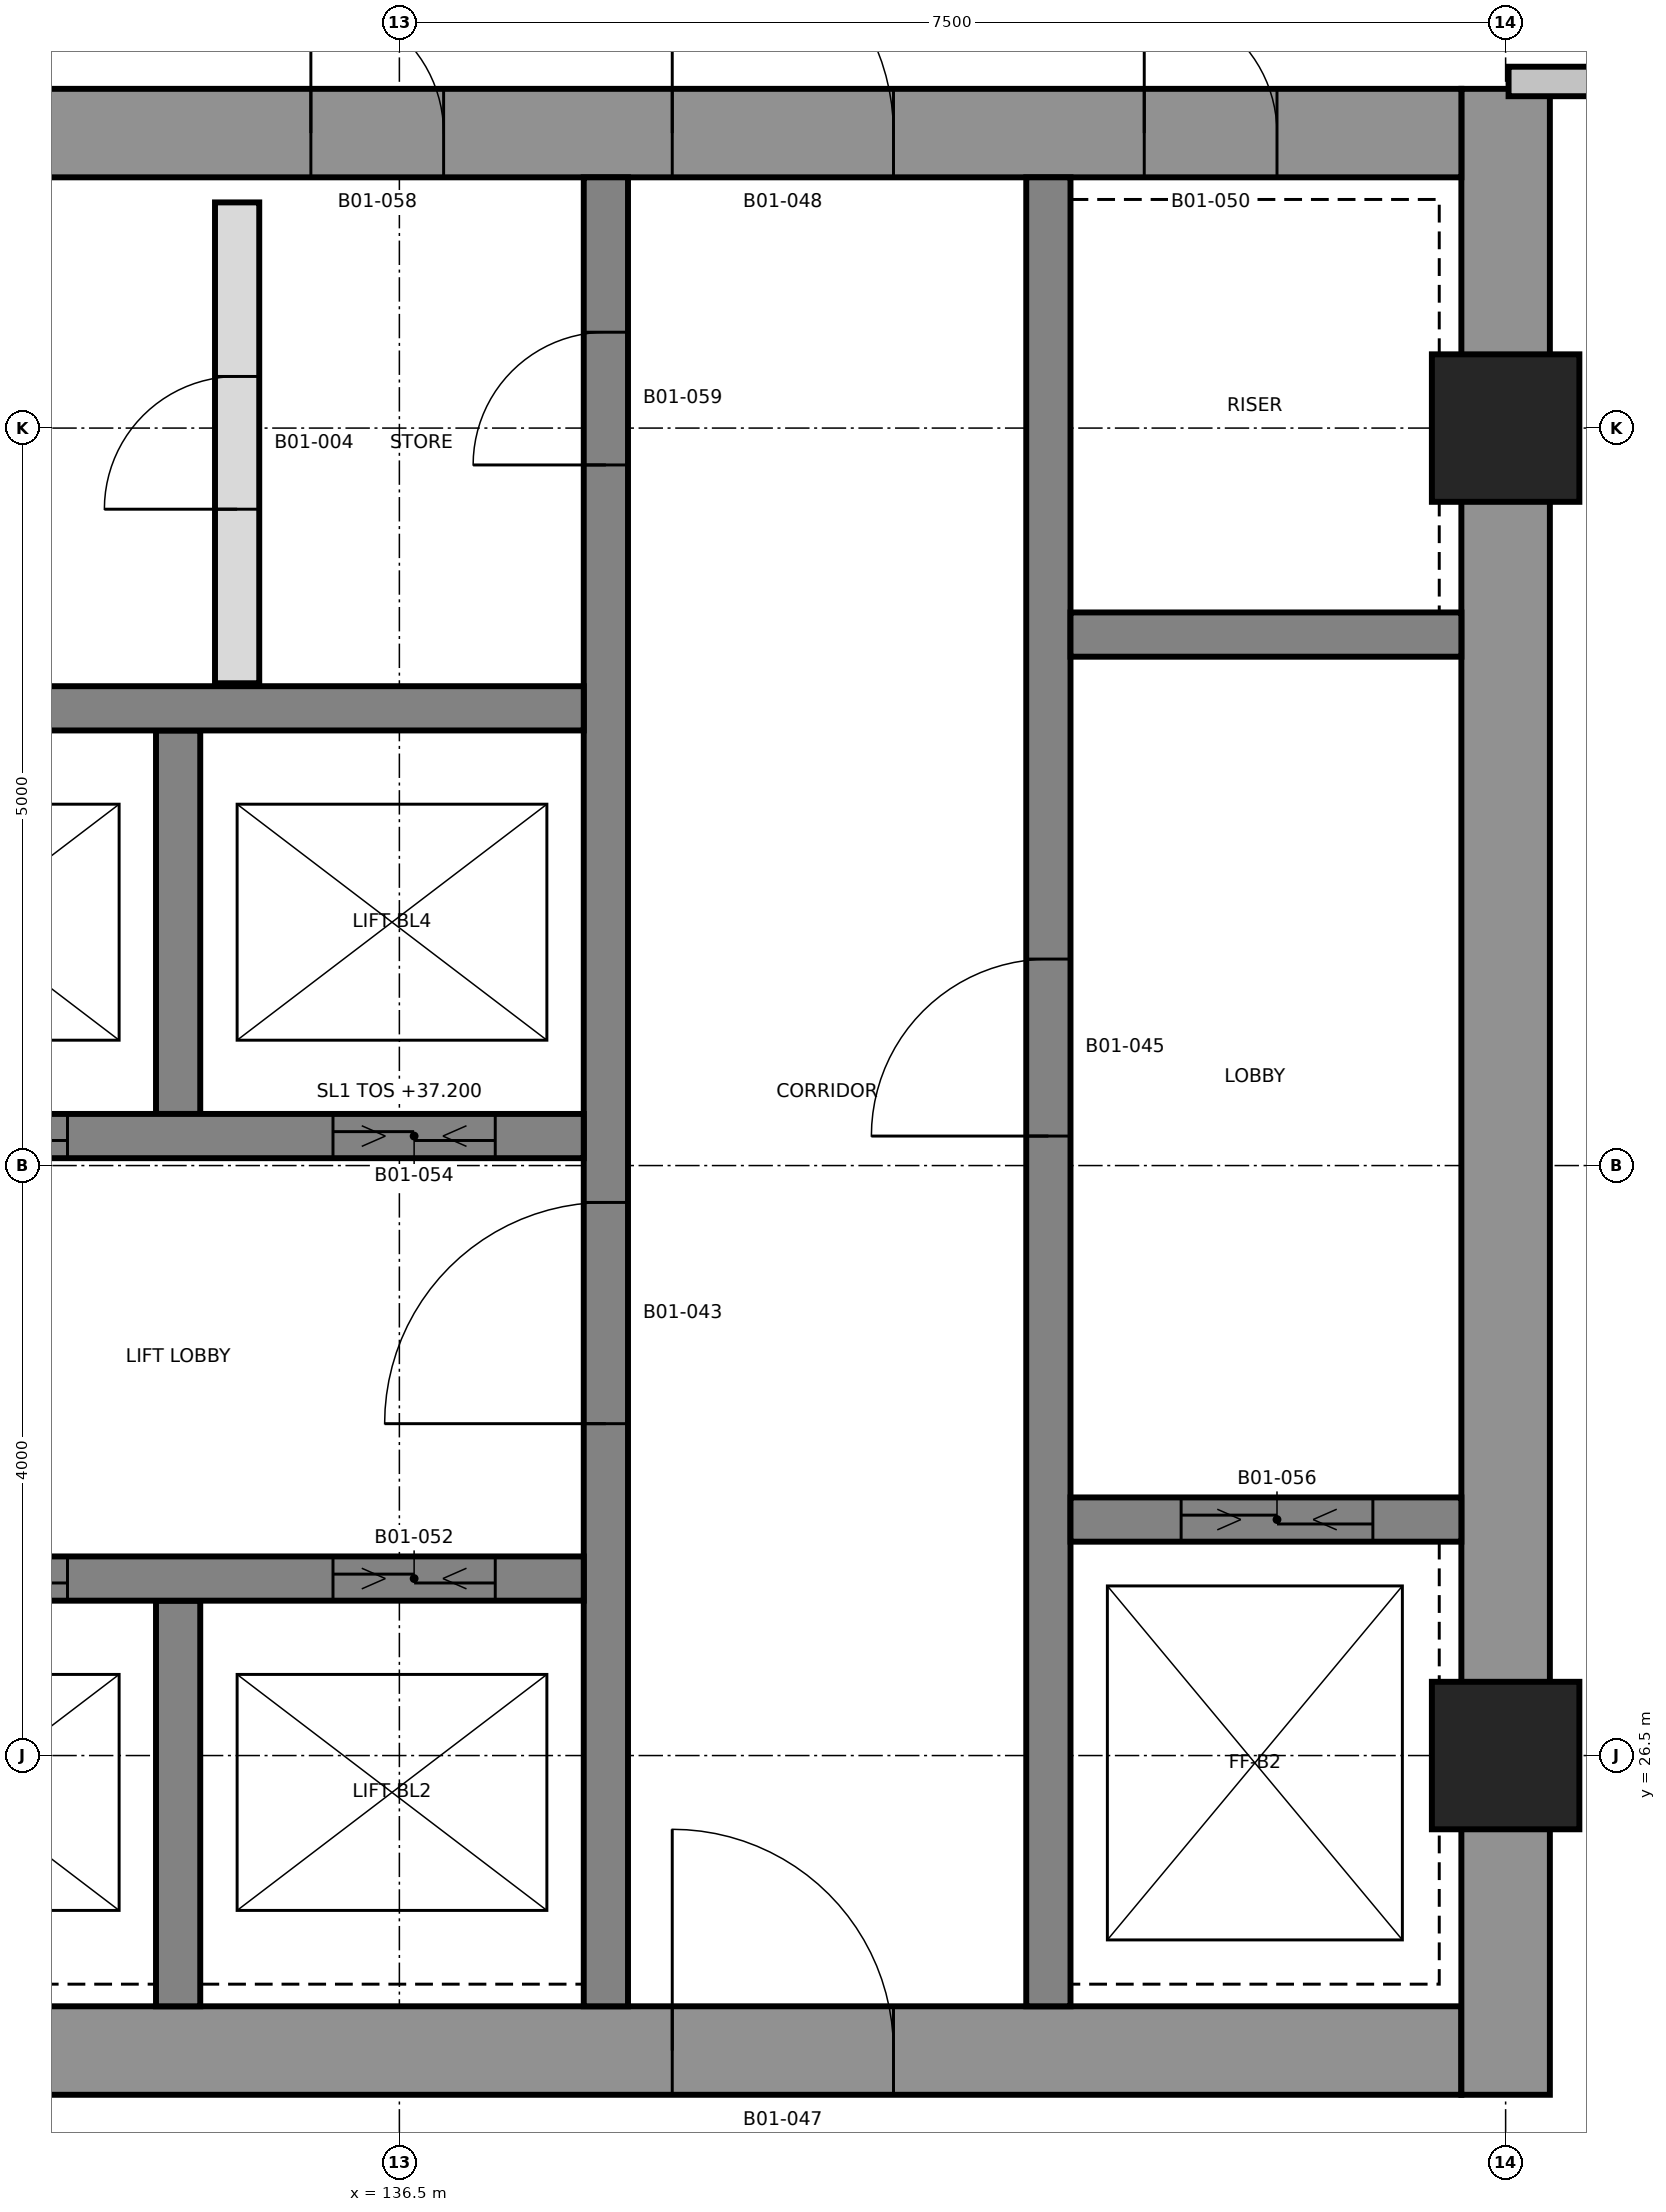
"""IFC4 building model, lengths in metres.
Left out: names, types, materials, properties, quantities, classifications, styles, units other than length and angle.
Written with IfcOpenShell. Run it as: python <this file> out.ifc"""

import sys

from ifc_helpers import new_model, si_unit, direction, frame, frame_2d, origin, origin_2d, place, context, subcontext, project, spatial, rectangle, extrude, element, fill, save


model = new_model("IFC4")
c1 = context("Model", 3, precision=1e-05, world=origin(), true_north=direction((0.0, 1.0)))
c2 = subcontext(c1, "Body", "Model", "MODEL_VIEW")
j1 = project(units=[si_unit("LENGTHUNIT", "METRE"), si_unit("PLANEANGLEUNIT", "RADIAN")], contexts=[c1])
p1 = place(None, origin())
s1 = spatial("IfcSite", under=j1, at=p1, CompositionType="ELEMENT")
p2 = place(p1, origin())
s2 = spatial("IfcBuilding", under=s1, at=p2, CompositionType="ELEMENT")
p3 = place(p2, frame((0.0, 0.0, 37.2)))
s3 = spatial("IfcBuildingStorey", under=s2, at=p3, CompositionType="ELEMENT", Elevation=37.2)
p4 = place(p3, frame((128.7, 24.5, 0.0), z_axis=(0.0, 0.0, 1.0), x_axis=(1.0, 0.0, 0.0)))
e1 = element("IfcWall", 1, at=p4, inside=s3, PredefinedType="SHEAR", context=c2, shape_type="SweptSolid", body=[
    extrude(rectangle(XDim=15.0, YDim=0.6, at=frame_2d((7.5, 0.0))), origin(), (0.0, 0.0, 1.0), 3.7),
])
p5 = place(p4, frame((9.65, 0.0, 0.0)))
e2 = element("IfcOpeningElement", 2, at=p5, cuts=e1, PredefinedType="OPENING", context=c2, shape_type="SweptSolid", body=[
    extrude(rectangle(XDim=1.5, YDim=2.1, at=frame_2d((0.75, 1.05))), frame((0.0, 0.31, 0.0), z_axis=(0.0, -1.0, 0.0), x_axis=(1.0, 0.0, 0.0)), (0.0, 0.0, 1.0), 0.62),
])
p6 = place(p4, frame((1.25, 0.0, 0.0)))
e3 = element("IfcOpeningElement", 3, at=p6, cuts=e1, PredefinedType="OPENING", context=c2, shape_type="SweptSolid", body=[
    extrude(rectangle(XDim=0.9, YDim=2.1, at=frame_2d((0.45, 1.05))), frame((0.0, 0.31, 0.0), z_axis=(0.0, -1.0, 0.0), x_axis=(1.0, 0.0, 0.0)), (0.0, 0.0, 1.0), 0.62),
])
p7 = place(p3, frame((144.0, 24.2, 0.0), z_axis=(0.0, 0.0, 1.0), x_axis=(0.0, 1.0, 0.0)))
e4 = element("IfcWall", 4, at=p7, inside=s3, PredefinedType="SHEAR", context=c2, shape_type="SweptSolid", body=[
    extrude(rectangle(XDim=13.6, YDim=0.6, at=frame_2d((6.8, 0.0))), origin(), (0.0, 0.0, 1.0), 3.7),
])
p8 = place(p3, frame((128.7, 37.5, 0.0), z_axis=(0.0, 0.0, 1.0), x_axis=(1.0, 0.0, 0.0)))
e5 = element("IfcWall", 5, at=p8, inside=s3, PredefinedType="SHEAR", context=c2, shape_type="SweptSolid", body=[
    extrude(rectangle(XDim=15.0, YDim=0.6, at=frame_2d((7.5, 0.0))), origin(), (0.0, 0.0, 1.0), 3.7),
])
p9 = place(p8, frame((9.65, 0.0, 0.0)))
e6 = element("IfcOpeningElement", 6, at=p9, cuts=e5, PredefinedType="OPENING", context=c2, shape_type="SweptSolid", body=[
    extrude(rectangle(XDim=1.5, YDim=2.1, at=frame_2d((0.75, 1.05))), frame((0.0, 0.31, 0.0), z_axis=(0.0, -1.0, 0.0), x_axis=(1.0, 0.0, 0.0)), (0.0, 0.0, 1.0), 0.62),
])
p10 = place(p8, frame((12.85, 0.0, 0.0)))
e7 = element("IfcOpeningElement", 7, at=p10, cuts=e5, PredefinedType="OPENING", context=c2, shape_type="SweptSolid", body=[
    extrude(rectangle(XDim=0.9, YDim=2.1, at=frame_2d((0.45, 1.05))), frame((0.0, 0.31, 0.0), z_axis=(0.0, -1.0, 0.0), x_axis=(1.0, 0.0, 0.0)), (0.0, 0.0, 1.0), 0.62),
])
p11 = place(p8, frame((4.3, 0.0, 0.0)))
e8 = element("IfcOpeningElement", 8, at=p11, cuts=e5, PredefinedType="OPENING", context=c2, shape_type="SweptSolid", body=[
    extrude(rectangle(XDim=0.9, YDim=2.1, at=frame_2d((0.45, 1.05))), frame((0.0, 0.31, 0.0), z_axis=(0.0, -1.0, 0.0), x_axis=(1.0, 0.0, 0.0)), (0.0, 0.0, 1.0), 0.62),
])
p12 = place(p8, frame((7.2, 0.0, 0.0)))
e9 = element("IfcOpeningElement", 9, at=p12, cuts=e5, PredefinedType="OPENING", context=c2, shape_type="SweptSolid", body=[
    extrude(rectangle(XDim=0.9, YDim=2.1, at=frame_2d((0.45, 1.05))), frame((0.0, 0.31, 0.0), z_axis=(0.0, -1.0, 0.0), x_axis=(1.0, 0.0, 0.0)), (0.0, 0.0, 1.0), 0.62),
])
p13 = place(p3, frame((137.9, 24.8, 0.0), z_axis=(0.0, 0.0, 1.0), x_axis=(0.0, 1.0, 0.0)))
e10 = element("IfcWall", 10, at=p13, inside=s3, PredefinedType="SHEAR", context=c2, shape_type="SweptSolid", body=[
    extrude(rectangle(XDim=12.4, YDim=0.3, at=frame_2d((6.2, 0.0))), origin(), (0.0, 0.0, 1.0), 3.7),
])
p14 = place(p13, frame((3.95, 0.0, 0.0)))
e11 = element("IfcOpeningElement", 11, at=p14, cuts=e10, PredefinedType="OPENING", context=c2, shape_type="SweptSolid", body=[
    extrude(rectangle(XDim=1.5, YDim=2.1, at=frame_2d((0.75, 1.05))), frame((0.0, 0.16, 0.0), z_axis=(0.0, -1.0, 0.0), x_axis=(1.0, 0.0, 0.0)), (0.0, 0.0, 1.0), 0.32),
])
p15 = place(p13, frame((10.45, 0.0, 0.0)))
e12 = element("IfcOpeningElement", 12, at=p15, cuts=e10, PredefinedType="OPENING", context=c2, shape_type="SweptSolid", body=[
    extrude(rectangle(XDim=0.9, YDim=2.1, at=frame_2d((0.45, 1.05))), frame((0.0, 0.16, 0.0), z_axis=(0.0, -1.0, 0.0), x_axis=(1.0, 0.0, 0.0)), (0.0, 0.0, 1.0), 0.32),
])
p16 = place(p3, frame((140.9, 24.8, 0.0), z_axis=(0.0, 0.0, 1.0), x_axis=(0.0, 1.0, 0.0)))
e13 = element("IfcWall", 13, at=p16, inside=s3, PredefinedType="SHEAR", context=c2, shape_type="SweptSolid", body=[
    extrude(rectangle(XDim=12.4, YDim=0.3, at=frame_2d((6.2, 0.0))), origin(), (0.0, 0.0, 1.0), 3.7),
])
p17 = place(p16, frame((5.9, 0.0, 0.0)))
e14 = element("IfcOpeningElement", 14, at=p17, cuts=e13, PredefinedType="OPENING", context=c2, shape_type="SweptSolid", body=[
    extrude(rectangle(XDim=1.2, YDim=2.1, at=frame_2d((0.6, 1.05))), frame((0.0, 0.16, 0.0), z_axis=(0.0, -1.0, 0.0), x_axis=(1.0, 0.0, 0.0)), (0.0, 0.0, 1.0), 0.32),
])
p18 = place(p3, frame((135.0, 24.8, 0.0), z_axis=(0.0, 0.0, 1.0), x_axis=(0.0, 1.0, 0.0)))
e15 = element("IfcWall", 15, at=p18, inside=s3, PredefinedType="SHEAR", context=c2, shape_type="SweptSolid", body=[
    extrude(rectangle(XDim=2.75, YDim=0.3, at=frame_2d((1.375, 0.0))), origin(), (0.0, 0.0, 1.0), 3.7),
])
p19 = place(p3, frame((135.0, 30.85, 0.0), z_axis=(0.0, 0.0, 1.0), x_axis=(0.0, 1.0, 0.0)))
e16 = element("IfcWall", 16, at=p19, inside=s3, PredefinedType="SHEAR", context=c2, shape_type="SweptSolid", body=[
    extrude(rectangle(XDim=2.6, YDim=0.3, at=frame_2d((1.3, 0.0))), origin(), (0.0, 0.0, 1.0), 3.7),
])
p20 = place(p3, frame((132.25, 27.7, 0.0), z_axis=(0.0, 0.0, 1.0), x_axis=(1.0, 0.0, 0.0)))
e17 = element("IfcWall", 17, at=p20, inside=s3, PredefinedType="SHEAR", context=c2, shape_type="SweptSolid", body=[
    extrude(rectangle(XDim=5.5, YDim=0.3, at=frame_2d((2.75, 0.0))), origin(), (0.0, 0.0, 1.0), 3.7),
])
p21 = place(p20, frame((0.9, 0.0, 0.0)))
e18 = element("IfcOpeningElement", 18, at=p21, cuts=e17, PredefinedType="OPENING", context=c2, shape_type="SweptSolid", body=[
    extrude(rectangle(XDim=1.1, YDim=2.4, at=frame_2d((0.55, 1.2))), frame((0.0, 0.16, 0.0), z_axis=(0.0, -1.0, 0.0), x_axis=(1.0, 0.0, 0.0)), (0.0, 0.0, 1.0), 0.32),
])
p22 = place(p20, frame((3.8, 0.0, 0.0)))
e19 = element("IfcOpeningElement", 19, at=p22, cuts=e17, PredefinedType="OPENING", context=c2, shape_type="SweptSolid", body=[
    extrude(rectangle(XDim=1.1, YDim=2.4, at=frame_2d((0.55, 1.2))), frame((0.0, 0.16, 0.0), z_axis=(0.0, -1.0, 0.0), x_axis=(1.0, 0.0, 0.0)), (0.0, 0.0, 1.0), 0.32),
])
p23 = place(p3, frame((132.25, 30.7, 0.0), z_axis=(0.0, 0.0, 1.0), x_axis=(1.0, 0.0, 0.0)))
e20 = element("IfcWall", 20, at=p23, inside=s3, PredefinedType="SHEAR", context=c2, shape_type="SweptSolid", body=[
    extrude(rectangle(XDim=5.5, YDim=0.3, at=frame_2d((2.75, 0.0))), origin(), (0.0, 0.0, 1.0), 3.7),
])
p24 = place(p23, frame((0.9, 0.0, 0.0)))
e21 = element("IfcOpeningElement", 21, at=p24, cuts=e20, PredefinedType="OPENING", context=c2, shape_type="SweptSolid", body=[
    extrude(rectangle(XDim=1.1, YDim=2.4, at=frame_2d((0.55, 1.2))), frame((0.0, 0.16, 0.0), z_axis=(0.0, -1.0, 0.0), x_axis=(1.0, 0.0, 0.0)), (0.0, 0.0, 1.0), 0.32),
])
p25 = place(p23, frame((3.8, 0.0, 0.0)))
e22 = element("IfcOpeningElement", 22, at=p25, cuts=e20, PredefinedType="OPENING", context=c2, shape_type="SweptSolid", body=[
    extrude(rectangle(XDim=1.1, YDim=2.4, at=frame_2d((0.55, 1.2))), frame((0.0, 0.16, 0.0), z_axis=(0.0, -1.0, 0.0), x_axis=(1.0, 0.0, 0.0)), (0.0, 0.0, 1.0), 0.32),
])
p26 = place(p3, frame((132.25, 33.6, 0.0), z_axis=(0.0, 0.0, 1.0), x_axis=(1.0, 0.0, 0.0)))
e23 = element("IfcWall", 23, at=p26, inside=s3, PredefinedType="SHEAR", context=c2, shape_type="SweptSolid", body=[
    extrude(rectangle(XDim=5.5, YDim=0.3, at=frame_2d((2.75, 0.0))), origin(), (0.0, 0.0, 1.0), 3.7),
])
p27 = place(p3, frame((141.05, 28.1, 0.0), z_axis=(0.0, 0.0, 1.0), x_axis=(1.0, 0.0, 0.0)))
e24 = element("IfcWall", 24, at=p27, inside=s3, PredefinedType="SHEAR", context=c2, shape_type="SweptSolid", body=[
    extrude(rectangle(XDim=2.65, YDim=0.3, at=frame_2d((1.325, 0.0))), origin(), (0.0, 0.0, 1.0), 3.7),
])
p28 = place(p27, frame((0.75, 0.0, 0.0)))
e25 = element("IfcOpeningElement", 25, at=p28, cuts=e24, PredefinedType="OPENING", context=c2, shape_type="SweptSolid", body=[
    extrude(rectangle(XDim=1.3, YDim=2.4, at=frame_2d((0.65, 1.2))), frame((0.0, 0.16, 0.0), z_axis=(0.0, -1.0, 0.0), x_axis=(1.0, 0.0, 0.0)), (0.0, 0.0, 1.0), 0.32),
])
p29 = place(p3, frame((141.05, 34.1, 0.0), z_axis=(0.0, 0.0, 1.0), x_axis=(1.0, 0.0, 0.0)))
e26 = element("IfcWall", 26, at=p29, inside=s3, PredefinedType="SHEAR", context=c2, shape_type="SweptSolid", body=[
    extrude(rectangle(XDim=2.65, YDim=0.3, at=frame_2d((1.325, 0.0))), origin(), (0.0, 0.0, 1.0), 3.7),
])
for number, where, z_axis, x_axis in (
    (27, (144.0, 26.5, 0.0), (0.0, 0.0, 1.0), (1.0, 0.0, 0.0)),
    (28, (144.0, 35.5, 0.0), (0.0, 0.0, 1.0), (1.0, 0.0, 0.0)),
):
    element("IfcColumn", number, at=place(p3, frame(where, z_axis=z_axis, x_axis=x_axis)), inside=s3, PredefinedType="COLUMN", context=c2, shape_type="SweptSolid", body=[
        extrude(rectangle(XDim=1.0, YDim=1.0, at=origin_2d()), origin(), (0.0, 0.0, 1.0), 3.7),
    ])
p30 = place(p3, frame((144.02, 37.85, 0.0), z_axis=(0.0, 0.0, 1.0), x_axis=(1.0, 0.0, 0.0)))
e29 = element("IfcWall", 29, at=p30, inside=s3, PredefinedType="PARTITIONING", context=c2, shape_type="SweptSolid", body=[
    extrude(rectangle(XDim=3.23, YDim=0.2, at=frame_2d((1.615, 0.0))), origin(), (0.0, 0.0, 1.0), 3.4),
])
p31 = place(p30, frame((1.03, 0.0, 0.0)))
e30 = element("IfcOpeningElement", 30, at=p31, cuts=e29, PredefinedType="OPENING", context=c2, shape_type="SweptSolid", body=[
    extrude(rectangle(XDim=1.5, YDim=2.1, at=frame_2d((0.75, 1.05))), frame((0.0, 0.11, 0.0), z_axis=(0.0, -1.0, 0.0), x_axis=(1.0, 0.0, 0.0)), (0.0, 0.0, 1.0), 0.22),
])
p32 = place(p3, frame((135.4, 33.77, 0.0), z_axis=(0.0, 0.0, 1.0), x_axis=(0.0, 1.0, 0.0)))
e31 = element("IfcWall", 31, at=p32, inside=s3, PredefinedType="PARTITIONING", context=c2, shape_type="SweptSolid", body=[
    extrude(rectangle(XDim=3.26, YDim=0.3, at=frame_2d((1.63, 0.0))), origin(), (0.0, 0.0, 1.0), 3.4),
])
p33 = place(p32, frame((1.18, 0.0, 0.0)))
e32 = element("IfcOpeningElement", 32, at=p33, cuts=e31, PredefinedType="OPENING", context=c2, shape_type="SweptSolid", body=[
    extrude(rectangle(XDim=0.9, YDim=2.1, at=frame_2d((0.45, 1.05))), frame((0.0, 0.16, 0.0), z_axis=(0.0, -1.0, 0.0), x_axis=(1.0, 0.0, 0.0)), (0.0, 0.0, 1.0), 0.32),
])
p34 = place(p33, origin())
e33 = element("IfcDoor", 33, at=p34, inside=s3, OperationType="SINGLE_SWING_RIGHT", PredefinedType="DOOR", context=c2, shape_type="SweptSolid", body=[
    extrude(rectangle(XDim=0.9, YDim=2.1, at=frame_2d((0.45, 1.05))), frame((0.0, 0.025, 0.0), z_axis=(0.0, -1.0, 0.0), x_axis=(1.0, 0.0, 0.0)), (0.0, 0.0, 1.0), 0.05),
])
fill(e32, e33)
p35 = place(p14, origin())
e34 = element("IfcDoor", 34, at=p35, inside=s3, OperationType="SINGLE_SWING_RIGHT", PredefinedType="DOOR", context=c2, shape_type="SweptSolid", body=[
    extrude(rectangle(XDim=1.5, YDim=2.1, at=frame_2d((0.75, 1.05))), frame((0.0, 0.025, 0.0), z_axis=(0.0, -1.0, 0.0), x_axis=(1.0, 0.0, 0.0)), (0.0, 0.0, 1.0), 0.05),
])
fill(e11, e34)
p36 = place(p17, origin())
e35 = element("IfcDoor", 35, at=p36, inside=s3, OperationType="SINGLE_SWING_RIGHT", PredefinedType="DOOR", context=c2, shape_type="SweptSolid", body=[
    extrude(rectangle(XDim=1.2, YDim=2.1, at=frame_2d((0.6, 1.05))), frame((0.0, 0.025, 0.0), z_axis=(0.0, -1.0, 0.0), x_axis=(1.0, 0.0, 0.0)), (0.0, 0.0, 1.0), 0.05),
])
fill(e14, e35)
p37 = place(p5, origin())
e36 = element("IfcDoor", 36, at=p37, inside=s3, OperationType="SINGLE_SWING_LEFT", PredefinedType="DOOR", context=c2, shape_type="SweptSolid", body=[
    extrude(rectangle(XDim=1.5, YDim=2.1, at=frame_2d((0.75, 1.05))), frame((0.0, 0.025, 0.0), z_axis=(0.0, -1.0, 0.0), x_axis=(1.0, 0.0, 0.0)), (0.0, 0.0, 1.0), 0.05),
])
fill(e2, e36)
p38 = place(p9, origin())
e37 = element("IfcDoor", 37, at=p38, inside=s3, OperationType="SINGLE_SWING_RIGHT", PredefinedType="DOOR", context=c2, shape_type="SweptSolid", body=[
    extrude(rectangle(XDim=1.5, YDim=2.1, at=frame_2d((0.75, 1.05))), frame((0.0, 0.025, 0.0), z_axis=(0.0, -1.0, 0.0), x_axis=(1.0, 0.0, 0.0)), (0.0, 0.0, 1.0), 0.05),
])
fill(e6, e37)
p39 = place(p10, origin())
e38 = element("IfcDoor", 38, at=p39, inside=s3, OperationType="SINGLE_SWING_RIGHT", PredefinedType="DOOR", context=c2, shape_type="SweptSolid", body=[
    extrude(rectangle(XDim=0.9, YDim=2.1, at=frame_2d((0.45, 1.05))), frame((0.0, 0.025, 0.0), z_axis=(0.0, -1.0, 0.0), x_axis=(1.0, 0.0, 0.0)), (0.0, 0.0, 1.0), 0.05),
])
fill(e7, e38)
p40 = place(p21, origin())
e39 = element("IfcDoor", 39, at=p40, inside=s3, OperationType="SLIDING_TO_LEFT", PredefinedType="DOOR", context=c2, shape_type="SweptSolid", body=[
    extrude(rectangle(XDim=1.1, YDim=2.4, at=frame_2d((0.55, 1.2))), frame((0.0, 0.025, 0.0), z_axis=(0.0, -1.0, 0.0), x_axis=(1.0, 0.0, 0.0)), (0.0, 0.0, 1.0), 0.05),
])
fill(e18, e39)
p41 = place(p22, origin())
e40 = element("IfcDoor", 40, at=p41, inside=s3, OperationType="SLIDING_TO_LEFT", PredefinedType="DOOR", context=c2, shape_type="SweptSolid", body=[
    extrude(rectangle(XDim=1.1, YDim=2.4, at=frame_2d((0.55, 1.2))), frame((0.0, 0.025, 0.0), z_axis=(0.0, -1.0, 0.0), x_axis=(1.0, 0.0, 0.0)), (0.0, 0.0, 1.0), 0.05),
])
fill(e19, e40)
p42 = place(p24, origin())
e41 = element("IfcDoor", 41, at=p42, inside=s3, OperationType="SLIDING_TO_LEFT", PredefinedType="DOOR", context=c2, shape_type="SweptSolid", body=[
    extrude(rectangle(XDim=1.1, YDim=2.4, at=frame_2d((0.55, 1.2))), frame((0.0, 0.025, 0.0), z_axis=(0.0, -1.0, 0.0), x_axis=(1.0, 0.0, 0.0)), (0.0, 0.0, 1.0), 0.05),
])
fill(e21, e41)
p43 = place(p25, origin())
e42 = element("IfcDoor", 42, at=p43, inside=s3, OperationType="SLIDING_TO_LEFT", PredefinedType="DOOR", context=c2, shape_type="SweptSolid", body=[
    extrude(rectangle(XDim=1.1, YDim=2.4, at=frame_2d((0.55, 1.2))), frame((0.0, 0.025, 0.0), z_axis=(0.0, -1.0, 0.0), x_axis=(1.0, 0.0, 0.0)), (0.0, 0.0, 1.0), 0.05),
])
fill(e22, e42)
p44 = place(p28, origin())
e43 = element("IfcDoor", 43, at=p44, inside=s3, OperationType="SLIDING_TO_LEFT", PredefinedType="DOOR", context=c2, shape_type="SweptSolid", body=[
    extrude(rectangle(XDim=1.3, YDim=2.4, at=frame_2d((0.65, 1.2))), frame((0.0, 0.025, 0.0), z_axis=(0.0, -1.0, 0.0), x_axis=(1.0, 0.0, 0.0)), (0.0, 0.0, 1.0), 0.05),
])
fill(e25, e43)
p45 = place(p12, origin())
e44 = element("IfcDoor", 44, at=p45, inside=s3, OperationType="SINGLE_SWING_RIGHT", PredefinedType="DOOR", context=c2, shape_type="SweptSolid", body=[
    extrude(rectangle(XDim=0.9, YDim=2.1, at=frame_2d((0.45, 1.05))), frame((0.0, 0.025, 0.0), z_axis=(0.0, -1.0, 0.0), x_axis=(1.0, 0.0, 0.0)), (0.0, 0.0, 1.0), 0.05),
])
fill(e9, e44)
p46 = place(p15, origin())
e45 = element("IfcDoor", 45, at=p46, inside=s3, OperationType="SINGLE_SWING_RIGHT", PredefinedType="DOOR", context=c2, shape_type="SweptSolid", body=[
    extrude(rectangle(XDim=0.9, YDim=2.1, at=frame_2d((0.45, 1.05))), frame((0.0, 0.025, 0.0), z_axis=(0.0, -1.0, 0.0), x_axis=(1.0, 0.0, 0.0)), (0.0, 0.0, 1.0), 0.05),
])
fill(e12, e45)
save(model, sys.argv[1])
